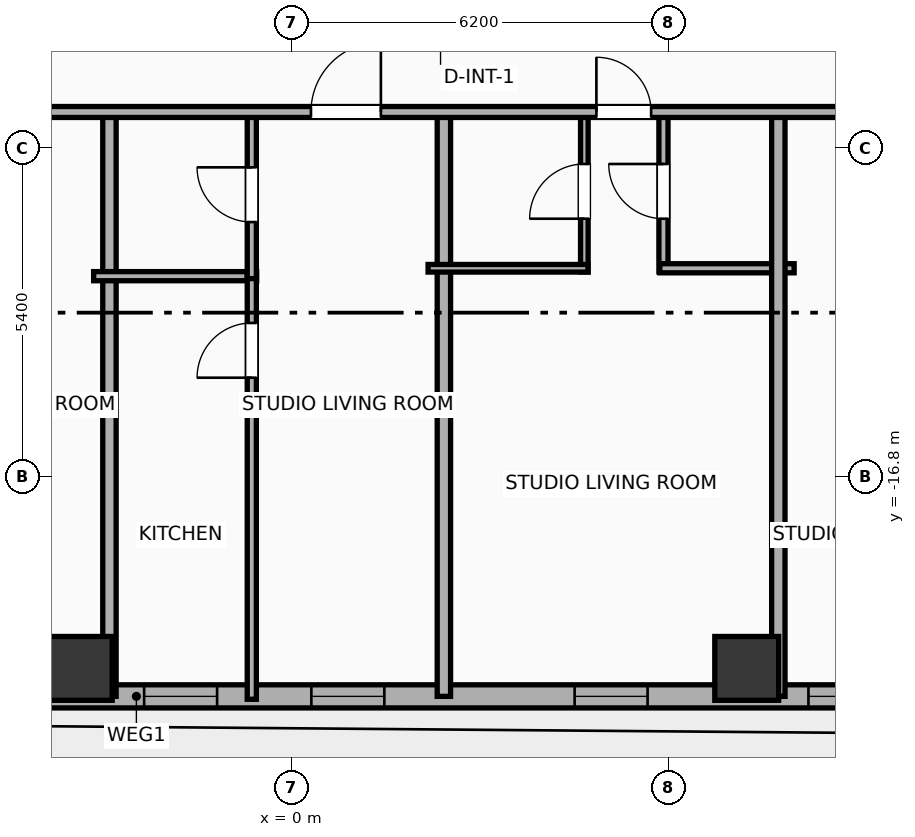
"""IFC4 building model, lengths in metres.
Left out: names, types, materials, properties, quantities, classifications, styles, units other than length and angle.
Written with IfcOpenShell. Run it as: python <this file> out.ifc"""

import sys

from ifc_helpers import new_model, si_unit, direction, frame, frame_2d, origin, origin_2d, place, context, subcontext, project, spatial, rectangle, hollow_rectangle, extrude, element, fill, save


model = new_model("IFC4")
c1 = context("Model", 3, precision=1e-05, world=origin(), true_north=direction((0.0, 1.0)))
c2 = subcontext(c1, "Body", "Model", "MODEL_VIEW")
j1 = project(units=[si_unit("LENGTHUNIT", "METRE"), si_unit("PLANEANGLEUNIT", "RADIAN")], contexts=[c1])
p1 = place(None, origin())
s1 = spatial("IfcSite", under=j1, at=p1, CompositionType="ELEMENT")
p2 = place(p1, origin())
s2 = spatial("IfcBuilding", under=s1, at=p2, CompositionType="ELEMENT")
p3 = place(p2, frame((0.0, 0.0, 85.8)))
s3 = spatial("IfcBuildingStorey", under=s2, at=p3, CompositionType="ELEMENT", Elevation=85.8)
for number, where, z_axis, x_axis in (
    (1, (-3.48, -19.95, -0.4), (0.0, 0.0, 1.0), (1.0, 0.0, 0.0)),
    (2, (7.48, -19.95, -0.4), (0.0, 0.0, 1.0), (1.0, 0.0, 0.0)),
):
    element("IfcColumn", number, at=place(p3, frame(where, z_axis=z_axis, x_axis=x_axis)), inside=s3, PredefinedType="COLUMN", context=c2, shape_type="SweptSolid", body=[
        extrude(hollow_rectangle(XDim=1.05, YDim=1.05, WallThickness=0.036, at=origin_2d()), origin(), (0.0, 0.0, 1.0), 4.3),
    ])
p4 = place(p3, frame((29.381, -20.41, 0.0), z_axis=(0.0, 0.0, 1.0), x_axis=(-1.0, 0.0, 0.0)))
e3 = element("IfcWall", 3, at=p4, inside=s3, PredefinedType="ELEMENTEDWALL", context=c2, shape_type="SweptSolid", body=[
    extrude(rectangle(XDim=54.763, YDim=0.38, at=frame_2d((27.381, 0.0))), origin(), (0.0, 0.0, 1.0), 2.54),
])
p5 = place(p4, frame((18.486, 0.0, 0.75)))
e4 = element("IfcOpeningElement", 4, at=p5, cuts=e3, PredefinedType="OPENING", context=c2, shape_type="SweptSolid", body=[
    extrude(rectangle(XDim=2.4, YDim=1.45, at=frame_2d((1.2, 0.725))), frame((0.0, 0.2, 0.0), z_axis=(0.0, -1.0, 0.0), x_axis=(1.0, 0.0, 0.0)), (0.0, 0.0, 1.0), 0.4),
])
p6 = place(p4, frame((47.567, 0.0, 0.75)))
e5 = element("IfcOpeningElement", 5, at=p6, cuts=e3, PredefinedType="OPENING", context=c2, shape_type="SweptSolid", body=[
    extrude(rectangle(XDim=2.4, YDim=1.45, at=frame_2d((1.2, 0.725))), frame((0.0, 0.2, 0.0), z_axis=(0.0, -1.0, 0.0), x_axis=(1.0, 0.0, 0.0)), (0.0, 0.0, 1.0), 0.4),
])
p7 = place(p4, frame((7.464, 0.0, 0.0)))
e6 = element("IfcOpeningElement", 6, at=p7, cuts=e3, PredefinedType="OPENING", context=c2, shape_type="SweptSolid", body=[
    extrude(rectangle(XDim=1.5, YDim=2.05, at=frame_2d((0.75, 1.025))), frame((0.0, 0.2, 0.0), z_axis=(0.0, -1.0, 0.0), x_axis=(1.0, 0.0, 0.0)), (0.0, 0.0, 1.0), 0.4),
])
p8 = place(p4, frame((51.831, 0.0, 0.55)))
e7 = element("IfcOpeningElement", 7, at=p8, cuts=e3, PredefinedType="OPENING", context=c2, shape_type="SweptSolid", body=[
    extrude(rectangle(XDim=1.2, YDim=1.15, at=frame_2d((0.6, 0.575))), frame((0.0, 0.2, 0.0), z_axis=(0.0, -1.0, 0.0), x_axis=(1.0, 0.0, 0.0)), (0.0, 0.0, 1.0), 0.4),
])
p9 = place(p4, frame((44.606, 0.0, 0.55)))
e8 = element("IfcOpeningElement", 8, at=p9, cuts=e3, PredefinedType="OPENING", context=c2, shape_type="SweptSolid", body=[
    extrude(rectangle(XDim=1.2, YDim=1.15, at=frame_2d((0.6, 0.575))), frame((0.0, 0.2, 0.0), z_axis=(0.0, -1.0, 0.0), x_axis=(1.0, 0.0, 0.0)), (0.0, 0.0, 1.0), 0.4),
])
p10 = place(p4, frame((38.906, 0.0, 0.55)))
e9 = element("IfcOpeningElement", 9, at=p10, cuts=e3, PredefinedType="OPENING", context=c2, shape_type="SweptSolid", body=[
    extrude(rectangle(XDim=1.2, YDim=1.15, at=frame_2d((0.6, 0.575))), frame((0.0, 0.2, 0.0), z_axis=(0.0, -1.0, 0.0), x_axis=(1.0, 0.0, 0.0)), (0.0, 0.0, 1.0), 0.4),
])
p11 = place(p4, frame((41.656, 0.0, 0.55)))
e10 = element("IfcOpeningElement", 10, at=p11, cuts=e3, PredefinedType="OPENING", context=c2, shape_type="SweptSolid", body=[
    extrude(rectangle(XDim=1.2, YDim=1.15, at=frame_2d((0.6, 0.575))), frame((0.0, 0.2, 0.0), z_axis=(0.0, -1.0, 0.0), x_axis=(1.0, 0.0, 0.0)), (0.0, 0.0, 1.0), 0.4),
])
p12 = place(p4, frame((33.666, 0.0, 0.55)))
e11 = element("IfcOpeningElement", 11, at=p12, cuts=e3, PredefinedType="OPENING", context=c2, shape_type="SweptSolid", body=[
    extrude(rectangle(XDim=1.2, YDim=1.15, at=frame_2d((0.6, 0.575))), frame((0.0, 0.2, 0.0), z_axis=(0.0, -1.0, 0.0), x_axis=(1.0, 0.0, 0.0)), (0.0, 0.0, 1.0), 0.4),
])
p13 = place(p4, frame((36.176, 0.0, 0.55)))
e12 = element("IfcOpeningElement", 12, at=p13, cuts=e3, PredefinedType="OPENING", context=c2, shape_type="SweptSolid", body=[
    extrude(rectangle(XDim=1.2, YDim=1.15, at=frame_2d((0.6, 0.575))), frame((0.0, 0.2, 0.0), z_axis=(0.0, -1.0, 0.0), x_axis=(1.0, 0.0, 0.0)), (0.0, 0.0, 1.0), 0.4),
])
p14 = place(p4, frame((27.861, 0.0, 0.55)))
e13 = element("IfcOpeningElement", 13, at=p14, cuts=e3, PredefinedType="OPENING", context=c2, shape_type="SweptSolid", body=[
    extrude(rectangle(XDim=1.2, YDim=1.15, at=frame_2d((0.6, 0.575))), frame((0.0, 0.2, 0.0), z_axis=(0.0, -1.0, 0.0), x_axis=(1.0, 0.0, 0.0)), (0.0, 0.0, 1.0), 0.4),
])
p15 = place(p4, frame((30.611, 0.0, 0.55)))
e14 = element("IfcOpeningElement", 14, at=p15, cuts=e3, PredefinedType="OPENING", context=c2, shape_type="SweptSolid", body=[
    extrude(rectangle(XDim=1.2, YDim=1.15, at=frame_2d((0.6, 0.575))), frame((0.0, 0.2, 0.0), z_axis=(0.0, -1.0, 0.0), x_axis=(1.0, 0.0, 0.0)), (0.0, 0.0, 1.0), 0.4),
])
p16 = place(p4, frame((23.531, 0.0, 0.55)))
e15 = element("IfcOpeningElement", 15, at=p16, cuts=e3, PredefinedType="OPENING", context=c2, shape_type="SweptSolid", body=[
    extrude(rectangle(XDim=1.2, YDim=1.15, at=frame_2d((0.6, 0.575))), frame((0.0, 0.2, 0.0), z_axis=(0.0, -1.0, 0.0), x_axis=(1.0, 0.0, 0.0)), (0.0, 0.0, 1.0), 0.4),
])
p17 = place(p4, frame((16.386, 0.0, 0.55)))
e16 = element("IfcOpeningElement", 16, at=p17, cuts=e3, PredefinedType="OPENING", context=c2, shape_type="SweptSolid", body=[
    extrude(rectangle(XDim=1.2, YDim=1.15, at=frame_2d((0.6, 0.575))), frame((0.0, 0.2, 0.0), z_axis=(0.0, -1.0, 0.0), x_axis=(1.0, 0.0, 0.0)), (0.0, 0.0, 1.0), 0.4),
])
p18 = place(p4, frame((12.531, 0.0, 0.55)))
e17 = element("IfcOpeningElement", 17, at=p18, cuts=e3, PredefinedType="OPENING", context=c2, shape_type="SweptSolid", body=[
    extrude(rectangle(XDim=1.2, YDim=1.15, at=frame_2d((0.6, 0.575))), frame((0.0, 0.2, 0.0), z_axis=(0.0, -1.0, 0.0), x_axis=(1.0, 0.0, 0.0)), (0.0, 0.0, 1.0), 0.4),
])
p19 = place(p4, frame((4.377, 0.0, 0.55)))
e18 = element("IfcOpeningElement", 18, at=p19, cuts=e3, PredefinedType="OPENING", context=c2, shape_type="SweptSolid", body=[
    extrude(rectangle(XDim=1.2, YDim=1.15, at=frame_2d((0.6, 0.575))), frame((0.0, 0.2, 0.0), z_axis=(0.0, -1.0, 0.0), x_axis=(1.0, 0.0, 0.0)), (0.0, 0.0, 1.0), 0.4),
])
p20 = place(p4, frame((1.481, 0.0, 0.55)))
e19 = element("IfcOpeningElement", 19, at=p20, cuts=e3, PredefinedType="OPENING", context=c2, shape_type="SweptSolid", body=[
    extrude(rectangle(XDim=1.2, YDim=1.15, at=frame_2d((0.6, 0.575))), frame((0.0, 0.2, 0.0), z_axis=(0.0, -1.0, 0.0), x_axis=(1.0, 0.0, 0.0)), (0.0, 0.0, 1.0), 0.4),
])
p21 = place(p3, frame((-3.0, -20.41, 0.0), z_axis=(0.0, 0.0, 1.0), x_axis=(0.0, 1.0, 0.0)))
e20 = element("IfcWall", 20, at=p21, inside=s3, PredefinedType="PARTITIONING", context=c2, shape_type="SweptSolid", body=[
    extrude(rectangle(XDim=9.69, YDim=0.22, at=frame_2d((4.845, 0.0))), origin(), (0.0, 0.0, 1.0), 2.54),
])
p22 = place(p3, frame((-3.26, -13.5, 0.0), z_axis=(0.0, 0.0, 1.0), x_axis=(1.0, 0.0, 0.0)))
e21 = element("IfcWall", 21, at=p22, inside=s3, PredefinedType="PLUMBINGWALL", context=c2, shape_type="SweptSolid", body=[
    extrude(rectangle(XDim=2.681, YDim=0.15, at=frame_2d((1.34, 0.0))), origin(), (0.0, 0.0, 1.0), 3.65),
])
p23 = place(p3, frame((-0.659, -20.458, 0.0), z_axis=(0.0, 0.0, 1.0), x_axis=(0.0, 1.0, 0.0)))
e22 = element("IfcWall", 22, at=p23, inside=s3, PredefinedType="PLUMBINGWALL", context=c2, shape_type="SweptSolid", body=[
    extrude(rectangle(XDim=6.998, YDim=0.15, at=frame_2d((3.499, 0.0))), origin(), (0.0, 0.0, 1.0), 3.65),
])
p24 = place(p23, frame((5.288, 0.0, 0.0)))
e23 = element("IfcOpeningElement", 23, at=p24, cuts=e22, PredefinedType="OPENING", context=c2, shape_type="SweptSolid", body=[
    extrude(rectangle(XDim=0.9, YDim=2.05, at=frame_2d((0.45, 1.025))), frame((0.0, 0.085, 0.0), z_axis=(0.0, -1.0, 0.0), x_axis=(1.0, 0.0, 0.0)), (0.0, 0.0, 1.0), 0.17),
])
p25 = place(p3, frame((-0.659, -13.54, 0.0), z_axis=(0.0, 0.0, 1.0), x_axis=(0.0, 1.0, 0.0)))
e24 = element("IfcWall", 24, at=p25, inside=s3, PredefinedType="PLUMBINGWALL", context=c2, shape_type="SweptSolid", body=[
    extrude(rectangle(XDim=2.76, YDim=0.15, at=frame_2d((1.38, 0.0))), origin(), (0.0, 0.0, 1.0), 3.65),
])
p26 = place(p25, frame((0.93, 0.0, 0.0)))
e25 = element("IfcOpeningElement", 25, at=p26, cuts=e24, PredefinedType="OPENING", context=c2, shape_type="SweptSolid", body=[
    extrude(rectangle(XDim=0.9, YDim=2.05, at=frame_2d((0.45, 1.025))), frame((0.0, 0.085, 0.0), z_axis=(0.0, -1.0, 0.0), x_axis=(1.0, 0.0, 0.0)), (0.0, 0.0, 1.0), 0.17),
])
p27 = place(p3, frame((2.5, -20.41, 0.0), z_axis=(0.0, 0.0, 1.0), x_axis=(0.0, 1.0, 0.0)))
e26 = element("IfcWall", 26, at=p27, inside=s3, PredefinedType="PARTITIONING", context=c2, shape_type="SweptSolid", body=[
    extrude(rectangle(XDim=9.69, YDim=0.22, at=frame_2d((4.845, 0.0))), origin(), (0.0, 0.0, 1.0), 3.65),
])
p28 = place(p3, frame((4.81, -13.43, 0.0), z_axis=(0.0, 0.0, 1.0), x_axis=(0.0, 1.0, 0.0)))
e27 = element("IfcWall", 27, at=p28, inside=s3, PredefinedType="PARTITIONING", context=c2, shape_type="SweptSolid", body=[
    extrude(rectangle(XDim=2.65, YDim=0.125, at=frame_2d((1.325, 0.0))), origin(), (0.0, 0.0, 1.0), 2.54),
])
p29 = place(p28, frame((0.875, 0.0, 0.0)))
e28 = element("IfcOpeningElement", 28, at=p29, cuts=e27, PredefinedType="OPENING", context=c2, shape_type="SweptSolid", body=[
    extrude(rectangle(XDim=0.9, YDim=2.05, at=frame_2d((0.45, 1.025))), frame((0.0, 0.073, 0.0), z_axis=(0.0, -1.0, 0.0), x_axis=(1.0, 0.0, 0.0)), (0.0, 0.0, 1.0), 0.145),
])
p30 = place(p3, frame((6.111, -13.43, 0.0), z_axis=(0.0, 0.0, 1.0), x_axis=(0.0, 1.0, 0.0)))
e29 = element("IfcWall", 29, at=p30, inside=s3, PredefinedType="PLUMBINGWALL", context=c2, shape_type="SweptSolid", body=[
    extrude(rectangle(XDim=2.65, YDim=0.15, at=frame_2d((1.325, 0.0))), origin(), (0.0, 0.0, 1.0), 2.54),
])
p31 = place(p30, frame((0.875, 0.0, 0.0)))
e30 = element("IfcOpeningElement", 30, at=p31, cuts=e29, PredefinedType="OPENING", context=c2, shape_type="SweptSolid", body=[
    extrude(rectangle(XDim=0.9, YDim=2.05, at=frame_2d((0.45, 1.025))), frame((0.0, 0.085, 0.0), z_axis=(0.0, -1.0, 0.0), x_axis=(1.0, 0.0, 0.0)), (0.0, 0.0, 1.0), 0.17),
])
p32 = place(p3, frame((2.24, -13.37, 0.0), z_axis=(0.0, 0.0, 1.0), x_axis=(1.0, 0.0, 0.0)))
e31 = element("IfcWall", 31, at=p32, inside=s3, PredefinedType="PARTITIONING", context=c2, shape_type="SweptSolid", body=[
    extrude(rectangle(XDim=2.63, YDim=0.125, at=frame_2d((1.315, 0.0))), origin(), (0.0, 0.0, 1.0), 3.65),
])
p33 = place(p3, frame((6.051, -13.37, 0.0), z_axis=(0.0, 0.0, 1.0), x_axis=(1.0, 0.0, 0.0)))
e32 = element("IfcWall", 32, at=p33, inside=s3, PredefinedType="PLUMBINGWALL", context=c2, shape_type="SweptSolid", body=[
    extrude(rectangle(XDim=2.209, YDim=0.15, at=frame_2d((1.104, 0.0))), origin(), (0.0, 0.0, 1.0), 3.65),
])
p34 = place(p3, frame((8.0, -20.41, 0.0), z_axis=(0.0, 0.0, 1.0), x_axis=(0.0, 1.0, 0.0)))
e33 = element("IfcWall", 33, at=p34, inside=s3, PredefinedType="PARTITIONING", context=c2, shape_type="SweptSolid", body=[
    extrude(rectangle(XDim=9.69, YDim=0.22, at=frame_2d((4.845, 0.0))), origin(), (0.0, 0.0, 1.0), 2.54),
])
p35 = place(p3, frame((-29.21, -10.8, 0.0), z_axis=(0.0, 0.0, 1.0), x_axis=(1.0, 0.0, 0.0)))
e34 = element("IfcWall", 34, at=p35, inside=s3, PredefinedType="PARTITIONING", context=c2, shape_type="SweptSolid", body=[
    extrude(rectangle(XDim=62.42, YDim=0.18, at=frame_2d((31.21, 0.0))), origin(), (0.0, 0.0, 1.0), 3.65),
])
p36 = place(p35, frame((3.357, 0.0, 0.0)))
e35 = element("IfcOpeningElement", 35, at=p36, cuts=e34, PredefinedType="OPENING", context=c2, shape_type="SweptSolid", body=[
    extrude(rectangle(XDim=1.15, YDim=2.05, at=frame_2d((0.575, 1.025))), frame((0.0, 0.1, 0.0), z_axis=(0.0, -1.0, 0.0), x_axis=(1.0, 0.0, 0.0)), (0.0, 0.0, 1.0), 0.2),
])
p37 = place(p35, frame((10.998, 0.0, 0.0)))
e36 = element("IfcOpeningElement", 36, at=p37, cuts=e34, PredefinedType="OPENING", context=c2, shape_type="SweptSolid", body=[
    extrude(rectangle(XDim=1.15, YDim=2.05, at=frame_2d((0.575, 1.025))), frame((0.0, 0.1, 0.0), z_axis=(0.0, -1.0, 0.0), x_axis=(1.0, 0.0, 0.0)), (0.0, 0.0, 1.0), 0.2),
])
p38 = place(p35, frame((18.482, 0.0, 0.0)))
e37 = element("IfcOpeningElement", 37, at=p38, cuts=e34, PredefinedType="OPENING", context=c2, shape_type="SweptSolid", body=[
    extrude(rectangle(XDim=1.15, YDim=2.05, at=frame_2d((0.575, 1.025))), frame((0.0, 0.1, 0.0), z_axis=(0.0, -1.0, 0.0), x_axis=(1.0, 0.0, 0.0)), (0.0, 0.0, 1.0), 0.2),
])
p39 = place(p35, frame((23.962, 0.0, 0.0)))
e38 = element("IfcOpeningElement", 38, at=p39, cuts=e34, PredefinedType="OPENING", context=c2, shape_type="SweptSolid", body=[
    extrude(rectangle(XDim=1.15, YDim=2.05, at=frame_2d((0.575, 1.025))), frame((0.0, 0.1, 0.0), z_axis=(0.0, -1.0, 0.0), x_axis=(1.0, 0.0, 0.0)), (0.0, 0.0, 1.0), 0.2),
])
p40 = place(p35, frame((29.524, 0.0, 0.0)))
e39 = element("IfcOpeningElement", 39, at=p40, cuts=e34, PredefinedType="OPENING", context=c2, shape_type="SweptSolid", body=[
    extrude(rectangle(XDim=1.15, YDim=2.05, at=frame_2d((0.575, 1.025))), frame((0.0, 0.1, 0.0), z_axis=(0.0, -1.0, 0.0), x_axis=(1.0, 0.0, 0.0)), (0.0, 0.0, 1.0), 0.2),
])
p41 = place(p35, frame((34.218, 0.0, 0.0)))
e40 = element("IfcOpeningElement", 40, at=p41, cuts=e34, PredefinedType="OPENING", context=c2, shape_type="SweptSolid", body=[
    extrude(rectangle(XDim=0.9, YDim=2.05, at=frame_2d((0.45, 1.025))), frame((0.0, 0.1, 0.0), z_axis=(0.0, -1.0, 0.0), x_axis=(1.0, 0.0, 0.0)), (0.0, 0.0, 1.0), 0.2),
])
p42 = place(p35, frame((38.313, 0.0, 0.0)))
e41 = element("IfcOpeningElement", 41, at=p42, cuts=e34, PredefinedType="OPENING", context=c2, shape_type="SweptSolid", body=[
    extrude(rectangle(XDim=1.15, YDim=2.05, at=frame_2d((0.575, 1.025))), frame((0.0, 0.1, 0.0), z_axis=(0.0, -1.0, 0.0), x_axis=(1.0, 0.0, 0.0)), (0.0, 0.0, 1.0), 0.2),
])
p43 = place(p35, frame((45.223, 0.0, 0.0)))
e42 = element("IfcOpeningElement", 42, at=p43, cuts=e34, PredefinedType="OPENING", context=c2, shape_type="SweptSolid", body=[
    extrude(rectangle(XDim=0.9, YDim=2.05, at=frame_2d((0.45, 1.025))), frame((0.0, 0.1, 0.0), z_axis=(0.0, -1.0, 0.0), x_axis=(1.0, 0.0, 0.0)), (0.0, 0.0, 1.0), 0.2),
])
p44 = place(p35, frame((51.352, 0.0, 0.0)))
e43 = element("IfcOpeningElement", 43, at=p44, cuts=e34, PredefinedType="OPENING", context=c2, shape_type="SweptSolid", body=[
    extrude(rectangle(XDim=1.15, YDim=2.05, at=frame_2d((0.575, 1.025))), frame((0.0, 0.1, 0.0), z_axis=(0.0, -1.0, 0.0), x_axis=(1.0, 0.0, 0.0)), (0.0, 0.0, 1.0), 0.2),
])
p45 = place(p35, frame((58.493, 0.0, 0.0)))
e44 = element("IfcOpeningElement", 44, at=p45, cuts=e34, PredefinedType="OPENING", context=c2, shape_type="SweptSolid", body=[
    extrude(rectangle(XDim=1.15, YDim=2.05, at=frame_2d((0.575, 1.025))), frame((0.0, 0.1, 0.0), z_axis=(0.0, -1.0, 0.0), x_axis=(1.0, 0.0, 0.0)), (0.0, 0.0, 1.0), 0.2),
])
p46 = place(p5, origin())
e45 = element("IfcWindow", 45, at=p46, inside=s3, PartitioningType="SINGLE_PANEL", PredefinedType="WINDOW", context=c2, shape_type="SweptSolid", body=[
    extrude(rectangle(XDim=2.4, YDim=1.45, at=frame_2d((1.2, 0.725))), frame((0.0, 0.03, 0.0), z_axis=(0.0, -1.0, 0.0), x_axis=(1.0, 0.0, 0.0)), (0.0, 0.0, 1.0), 0.06),
])
fill(e4, e45)
p47 = place(p14, origin())
e46 = element("IfcWindow", 46, at=p47, inside=s3, PartitioningType="SINGLE_PANEL", PredefinedType="WINDOW", context=c2, shape_type="SweptSolid", body=[
    extrude(rectangle(XDim=1.2, YDim=1.15, at=frame_2d((0.6, 0.575))), frame((0.0, 0.03, 0.0), z_axis=(0.0, -1.0, 0.0), x_axis=(1.0, 0.0, 0.0)), (0.0, 0.0, 1.0), 0.06),
])
fill(e13, e46)
p48 = place(p15, origin())
e47 = element("IfcWindow", 47, at=p48, inside=s3, PartitioningType="SINGLE_PANEL", PredefinedType="WINDOW", context=c2, shape_type="SweptSolid", body=[
    extrude(rectangle(XDim=1.2, YDim=1.15, at=frame_2d((0.6, 0.575))), frame((0.0, 0.03, 0.0), z_axis=(0.0, -1.0, 0.0), x_axis=(1.0, 0.0, 0.0)), (0.0, 0.0, 1.0), 0.06),
])
fill(e14, e47)
p49 = place(p16, origin())
e48 = element("IfcWindow", 48, at=p49, inside=s3, PartitioningType="SINGLE_PANEL", PredefinedType="WINDOW", context=c2, shape_type="SweptSolid", body=[
    extrude(rectangle(XDim=1.2, YDim=1.15, at=frame_2d((0.6, 0.575))), frame((0.0, 0.03, 0.0), z_axis=(0.0, -1.0, 0.0), x_axis=(1.0, 0.0, 0.0)), (0.0, 0.0, 1.0), 0.06),
])
fill(e15, e48)
p50 = place(p24, origin())
e49 = element("IfcDoor", 49, at=p50, inside=s3, OperationType="SINGLE_SWING_LEFT", PredefinedType="DOOR", context=c2, shape_type="SweptSolid", body=[
    extrude(rectangle(XDim=0.9, YDim=2.05, at=frame_2d((0.45, 1.025))), frame((0.0, 0.025, 0.0), z_axis=(0.0, -1.0, 0.0), x_axis=(1.0, 0.0, 0.0)), (0.0, 0.0, 1.0), 0.05),
])
fill(e23, e49)
p51 = place(p26, origin())
e50 = element("IfcDoor", 50, at=p51, inside=s3, OperationType="SINGLE_SWING_RIGHT", PredefinedType="DOOR", context=c2, shape_type="SweptSolid", body=[
    extrude(rectangle(XDim=0.9, YDim=2.05, at=frame_2d((0.45, 1.025))), frame((0.0, 0.025, 0.0), z_axis=(0.0, -1.0, 0.0), x_axis=(1.0, 0.0, 0.0)), (0.0, 0.0, 1.0), 0.05),
])
fill(e25, e50)
p52 = place(p29, origin())
e51 = element("IfcDoor", 51, at=p52, inside=s3, OperationType="SINGLE_SWING_LEFT", PredefinedType="DOOR", context=c2, shape_type="SweptSolid", body=[
    extrude(rectangle(XDim=0.9, YDim=2.05, at=frame_2d((0.45, 1.025))), frame((0.0, 0.025, 0.0), z_axis=(0.0, -1.0, 0.0), x_axis=(1.0, 0.0, 0.0)), (0.0, 0.0, 1.0), 0.05),
])
fill(e28, e51)
p53 = place(p31, origin())
e52 = element("IfcDoor", 52, at=p53, inside=s3, OperationType="SINGLE_SWING_RIGHT", PredefinedType="DOOR", context=c2, shape_type="SweptSolid", body=[
    extrude(rectangle(XDim=0.9, YDim=2.05, at=frame_2d((0.45, 1.025))), frame((0.0, 0.025, 0.0), z_axis=(0.0, -1.0, 0.0), x_axis=(1.0, 0.0, 0.0)), (0.0, 0.0, 1.0), 0.05),
])
fill(e30, e52)
p54 = place(p40, origin())
e53 = element("IfcDoor", 53, at=p54, inside=s3, OperationType="SINGLE_SWING_RIGHT", PredefinedType="DOOR", context=c2, shape_type="SweptSolid", body=[
    extrude(rectangle(XDim=1.15, YDim=2.05, at=frame_2d((0.575, 1.025))), frame((0.0, 0.025, 0.0), z_axis=(0.0, -1.0, 0.0), x_axis=(1.0, 0.0, 0.0)), (0.0, 0.0, 1.0), 0.05),
])
fill(e39, e53)
p55 = place(p41, origin())
e54 = element("IfcDoor", 54, at=p55, inside=s3, OperationType="SINGLE_SWING_LEFT", PredefinedType="DOOR", context=c2, shape_type="SweptSolid", body=[
    extrude(rectangle(XDim=0.9, YDim=2.05, at=frame_2d((0.45, 1.025))), frame((0.0, 0.025, 0.0), z_axis=(0.0, -1.0, 0.0), x_axis=(1.0, 0.0, 0.0)), (0.0, 0.0, 1.0), 0.05),
])
fill(e40, e54)
save(model, sys.argv[1])
